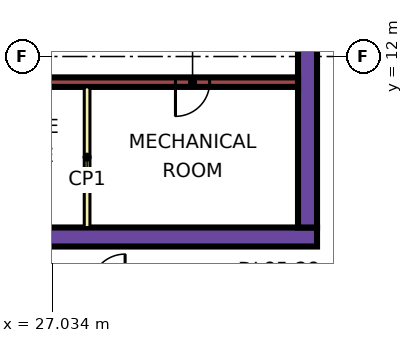
"""IFC4 building model, lengths in metres.
Left out: names, types, materials, properties, quantities, classifications, styles, units other than length and angle.
Written with IfcOpenShell. Run it as: python <this file> out.ifc"""

import sys

from ifc_helpers import new_model, si_unit, direction, frame, frame_2d, origin, place, context, subcontext, project, spatial, rectangle, extrude, element, fill, save


model = new_model("IFC4")
c1 = context("Model", 3, precision=1e-05, world=origin(), true_north=direction((0.0, 1.0)))
c2 = subcontext(c1, "Body", "Model", "MODEL_VIEW")
j1 = project(units=[si_unit("LENGTHUNIT", "METRE"), si_unit("PLANEANGLEUNIT", "RADIAN")], contexts=[c1])
p1 = place(None, origin())
s1 = spatial("IfcSite", under=j1, at=p1, CompositionType="ELEMENT")
p2 = place(p1, origin())
s2 = spatial("IfcBuilding", under=s1, at=p2, CompositionType="ELEMENT")
p3 = place(p2, frame((0.0, 0.0, 365.15)))
s3 = spatial("IfcBuildingStorey", under=s2, at=p3, CompositionType="ELEMENT", Elevation=365.15)
p4 = place(p3, frame((9.0, 7.25, 0.0), z_axis=(0.0, 0.0, 1.0), x_axis=(1.0, 0.0, 0.0)))
e1 = element("IfcWall", 1, at=p4, inside=s3, PredefinedType="SHEAR", context=c2, shape_type="SweptSolid", body=[
    extrude(rectangle(XDim=25.0, YDim=0.5, at=frame_2d((12.5, 0.0))), origin(), (0.0, 0.0, 1.0), 3.75),
])
p5 = place(p3, frame((33.75, 7.5, 0.0), z_axis=(0.0, 0.0, 1.0), x_axis=(0.0, 1.0, 0.0)))
e2 = element("IfcWall", 2, at=p5, inside=s3, PredefinedType="SHEAR", context=c2, shape_type="SweptSolid", body=[
    extrude(rectangle(XDim=12.0, YDim=0.5, at=frame_2d((6.0, 0.0))), origin(), (0.0, 0.0, 1.0), 3.75),
])
p6 = place(p5, frame((5.7, 0.0, 0.0)))
e3 = element("IfcOpeningElement", 3, at=p6, cuts=e2, PredefinedType="OPENING", context=c2, shape_type="SweptSolid", body=[
    extrude(rectangle(XDim=1.8, YDim=2.4, at=frame_2d((0.9, 1.2))), frame((0.0, 0.26, 0.0), z_axis=(0.0, -1.0, 0.0), x_axis=(1.0, 0.0, 0.0)), (0.0, 0.0, 1.0), 0.52),
])
p7 = place(p3, frame((13.45, 11.325, 0.0), z_axis=(0.0, 0.0, 1.0), x_axis=(1.0, 0.0, 0.0)))
e4 = element("IfcWall", 4, at=p7, inside=s3, PredefinedType="SHEAR", context=c2, shape_type="SweptSolid", body=[
    extrude(rectangle(XDim=20.05, YDim=0.25, at=frame_2d((10.025, 0.0))), origin(), (0.0, 0.0, 1.0), 3.75),
])
p8 = place(p7, frame((4.925, 0.0, 0.0)))
e5 = element("IfcOpeningElement", 5, at=p8, cuts=e4, PredefinedType="OPENING", context=c2, shape_type="SweptSolid", body=[
    extrude(rectangle(XDim=0.9, YDim=2.1, at=frame_2d((0.45, 1.05))), frame((0.0, 0.135, 0.0), z_axis=(0.0, -1.0, 0.0), x_axis=(1.0, 0.0, 0.0)), (0.0, 0.0, 1.0), 0.27),
])
p9 = place(p7, frame((12.3, 0.0, 0.0)))
e6 = element("IfcOpeningElement", 6, at=p9, cuts=e4, PredefinedType="OPENING", context=c2, shape_type="SweptSolid", body=[
    extrude(rectangle(XDim=0.9, YDim=2.1, at=frame_2d((0.45, 1.05))), frame((0.0, 0.135, 0.0), z_axis=(0.0, -1.0, 0.0), x_axis=(1.0, 0.0, 0.0)), (0.0, 0.0, 1.0), 0.27),
])
p10 = place(p7, frame((16.825, 0.0, 0.0)))
e7 = element("IfcOpeningElement", 7, at=p10, cuts=e4, PredefinedType="OPENING", context=c2, shape_type="SweptSolid", body=[
    extrude(rectangle(XDim=0.9, YDim=2.1, at=frame_2d((0.45, 1.05))), frame((0.0, 0.135, 0.0), z_axis=(0.0, -1.0, 0.0), x_axis=(1.0, 0.0, 0.0)), (0.0, 0.0, 1.0), 0.27),
])
p11 = place(p3, frame((27.95, 7.5, 0.0), z_axis=(0.0, 0.0, 1.0), x_axis=(0.0, 1.0, 0.0)))
e8 = element("IfcWall", 8, at=p11, inside=s3, PredefinedType="PARTITIONING", context=c2, shape_type="SweptSolid", body=[
    extrude(rectangle(XDim=3.7, YDim=0.15, at=frame_2d((1.85, 0.0))), origin(), (0.0, 0.0, 1.0), 3.35),
])
p12 = place(p10, frame((0.9, 0.0, 0.0), z_axis=(0.0, 0.0, 1.0), x_axis=(-1.0, 0.0, 0.0)))
e9 = element("IfcDoor", 9, at=p12, inside=s3, OperationType="SINGLE_SWING_LEFT", PredefinedType="DOOR", context=c2, shape_type="SweptSolid", body=[
    extrude(rectangle(XDim=0.9, YDim=2.1, at=frame_2d((0.45, 1.05))), frame((0.0, 0.025, 0.0), z_axis=(0.0, -1.0, 0.0), x_axis=(1.0, 0.0, 0.0)), (0.0, 0.0, 1.0), 0.05),
])
fill(e7, e9)
save(model, sys.argv[1])
